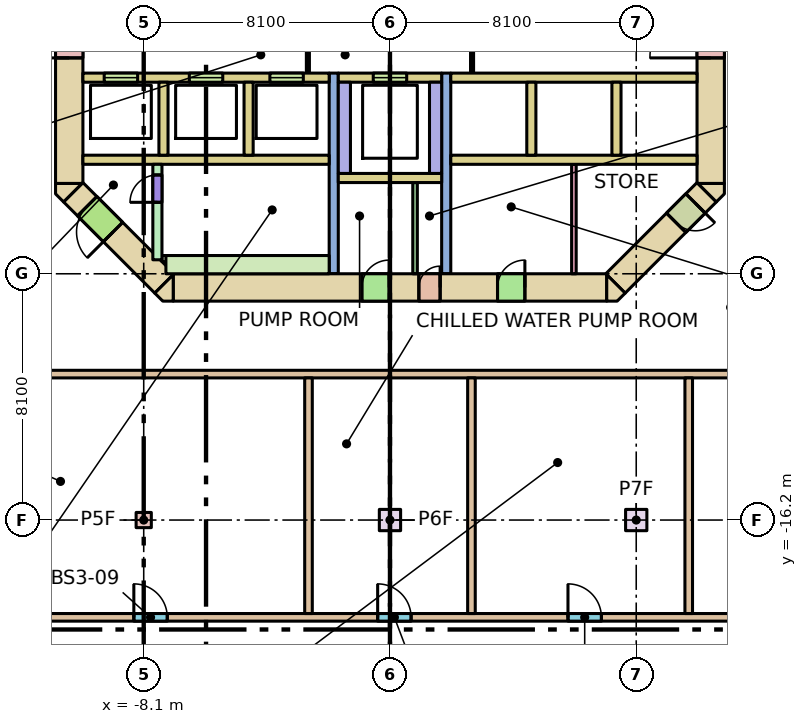
"""IFC4 building model, lengths in metres.
Left out: names, types, materials, properties, quantities, classifications, styles, units other than length and angle.
Written with IfcOpenShell. Run it as: python <this file> out.ifc"""

import sys

from ifc_helpers import new_model, si_unit, direction, frame, frame_2d, origin, origin_2d, place, context, subcontext, project, spatial, polyline, rectangle, outline, extrude, element, fill, save


model = new_model("IFC4")
c1 = context("Model", 3, precision=1e-05, world=origin(), true_north=direction((0.0, 1.0)))
c2 = subcontext(c1, "Body", "Model", "MODEL_VIEW")
j1 = project(units=[si_unit("LENGTHUNIT", "METRE"), si_unit("PLANEANGLEUNIT", "RADIAN")], contexts=[c1])
p1 = place(None, origin())
s1 = spatial("IfcSite", under=j1, at=p1, CompositionType="ELEMENT")
p2 = place(p1, origin())
s2 = spatial("IfcBuilding", under=s1, at=p2, CompositionType="ELEMENT")
p3 = place(p2, frame((0.0, 0.0, -10.8)))
s3 = spatial("IfcBuildingStorey", under=s2, at=p3, CompositionType="ELEMENT", Elevation=-10.8)
p4 = place(p3, frame((-8.1, -16.2, 0.0), z_axis=(0.0, 0.0, 1.0), x_axis=(1.0, 0.0, 0.0)))
e1 = element("IfcColumn", 1, at=p4, inside=s3, PredefinedType="COLUMN", context=c2, shape_type="SweptSolid", body=[
    extrude(rectangle(XDim=0.5, YDim=0.5, at=origin_2d()), origin(), (0.0, 0.0, 1.0), 3.6),
])
for number, where, z_axis, x_axis in (
    (2, (0.0, -16.2, 0.0), (0.0, 0.0, 1.0), (1.0, 0.0, 0.0)),
    (3, (8.1, -16.2, 0.0), (0.0, 0.0, 1.0), (1.0, 0.0, 0.0)),
):
    element("IfcColumn", number, at=place(p3, frame(where, z_axis=z_axis, x_axis=x_axis)), inside=s3, PredefinedType="COLUMN", context=c2, shape_type="SweptSolid", body=[
        extrude(rectangle(XDim=0.7, YDim=0.7, at=origin_2d()), origin(), (0.0, 0.0, 1.0), 3.6),
    ])
p5 = place(p3, frame((-7.13, -8.55, 0.0), z_axis=(0.0, 0.0, 1.0), x_axis=(1.0, 0.0, 0.0)))
e4 = element("IfcWall", 4, at=p5, inside=s3, PredefinedType="SHEAR", context=c2, shape_type="SweptSolid", body=[
    extrude(rectangle(XDim=14.26, YDim=0.9, at=frame_2d((7.13, 0.0))), origin(), (0.0, 0.0, 1.0), 3.28),
])
p6 = place(p5, frame((8.08, 0.0, 0.0)))
e5 = element("IfcOpeningElement", 5, at=p6, cuts=e4, PredefinedType="OPENING", context=c2, shape_type="SweptSolid", body=[
    extrude(rectangle(XDim=0.7, YDim=2.1, at=frame_2d((0.35, 1.05))), frame((0.0, 0.46, 0.0), z_axis=(0.0, -1.0, 0.0), x_axis=(1.0, 0.0, 0.0)), (0.0, 0.0, 1.0), 0.92),
])
p7 = place(p5, frame((6.205, 0.0, 0.0)))
e6 = element("IfcOpeningElement", 6, at=p7, cuts=e4, PredefinedType="OPENING", context=c2, shape_type="SweptSolid", body=[
    extrude(rectangle(XDim=0.9, YDim=2.1, at=frame_2d((0.45, 1.05))), frame((0.0, 0.46, 0.0), z_axis=(0.0, -1.0, 0.0), x_axis=(1.0, 0.0, 0.0)), (0.0, 0.0, 1.0), 0.92),
])
p8 = place(p5, frame((10.667, 0.0, 0.0)))
e7 = element("IfcOpeningElement", 7, at=p8, cuts=e4, PredefinedType="OPENING", context=c2, shape_type="SweptSolid", body=[
    extrude(rectangle(XDim=0.9, YDim=2.1, at=frame_2d((0.45, 1.05))), frame((0.0, 0.46, 0.0), z_axis=(0.0, -1.0, 0.0), x_axis=(1.0, 0.0, 0.0)), (0.0, 0.0, 1.0), 0.92),
])
p9 = place(p3, frame((-10.55, -5.13, 0.0), z_axis=(0.0, 0.0, 1.0), x_axis=(0.0, 1.0, 0.0)))
e8 = element("IfcWall", 8, at=p9, inside=s3, PredefinedType="SHEAR", context=c2, shape_type="SweptSolid", body=[
    extrude(rectangle(XDim=10.26, YDim=0.9, at=frame_2d((5.13, 0.0))), origin(), (0.0, 0.0, 1.0), 3.28),
])
p10 = place(p9, frame((4.13, 0.0, 0.0)))
e9 = element("IfcOpeningElement", 9, at=p10, cuts=e8, PredefinedType="OPENING", context=c2, shape_type="SweptSolid", body=[
    extrude(rectangle(XDim=2.0, YDim=2.1, at=frame_2d((1.0, 1.05))), frame((0.0, 0.46, 0.0), z_axis=(0.0, -1.0, 0.0), x_axis=(1.0, 0.0, 0.0)), (0.0, 0.0, 1.0), 0.92),
])
p11 = place(p3, frame((10.55, -5.13, 0.0), z_axis=(0.0, 0.0, 1.0), x_axis=(0.0, 1.0, 0.0)))
e10 = element("IfcWall", 10, at=p11, inside=s3, PredefinedType="SHEAR", context=c2, shape_type="SweptSolid", body=[
    extrude(rectangle(XDim=10.26, YDim=0.9, at=frame_2d((5.13, 0.0))), origin(), (0.0, 0.0, 1.0), 3.28),
])
p12 = place(p11, frame((4.13, 0.0, 0.0)))
e11 = element("IfcOpeningElement", 11, at=p12, cuts=e10, PredefinedType="OPENING", context=c2, shape_type="SweptSolid", body=[
    extrude(rectangle(XDim=2.0, YDim=2.1, at=frame_2d((1.0, 1.05))), frame((0.0, 0.46, 0.0), z_axis=(0.0, -1.0, 0.0), x_axis=(1.0, 0.0, 0.0)), (0.0, 0.0, 1.0), 0.92),
])
p13 = place(p3, frame((10.418, -5.418, 0.0), z_axis=(0.0, 0.0, 1.0), x_axis=(-0.707106781187, -0.707106781187, 0.0)))
e12 = element("IfcWall", 12, at=p13, inside=s3, PredefinedType="SHEAR", context=c2, shape_type="SweptSolid", body=[
    extrude(rectangle(XDim=4.243, YDim=0.9, at=frame_2d((2.121, 0.0))), origin(), (0.0, 0.0, 1.0), 3.28),
])
p14 = place(p13, frame((0.52, 0.0, 0.0)))
e13 = element("IfcOpeningElement", 13, at=p14, cuts=e12, PredefinedType="OPENING", context=c2, shape_type="SweptSolid", body=[
    extrude(rectangle(XDim=0.9, YDim=2.1, at=frame_2d((0.45, 1.05))), frame((0.0, 0.46, 0.0), z_axis=(0.0, -1.0, 0.0), x_axis=(1.0, 0.0, 0.0)), (0.0, 0.0, 1.0), 0.92),
])
p15 = place(p3, frame((-7.418, -8.418, 0.0), z_axis=(0.0, 0.0, 1.0), x_axis=(-0.707106781187, 0.707106781187, 0.0)))
e14 = element("IfcWall", 14, at=p15, inside=s3, PredefinedType="SHEAR", context=c2, shape_type="SweptSolid", body=[
    extrude(rectangle(XDim=4.243, YDim=0.9, at=frame_2d((2.121, 0.0))), origin(), (0.0, 0.0, 1.0), 3.28),
])
p16 = place(p15, frame((2.393, 0.0, 0.0)))
e15 = element("IfcOpeningElement", 15, at=p16, cuts=e14, PredefinedType="OPENING", context=c2, shape_type="SweptSolid", body=[
    extrude(rectangle(XDim=1.2, YDim=2.1, at=frame_2d((0.6, 1.05))), frame((0.0, 0.46, 0.0), z_axis=(0.0, -1.0, 0.0), x_axis=(1.0, 0.0, 0.0)), (0.0, 0.0, 1.0), 0.92),
])
p17 = place(p3, origin())
e16 = element("IfcWall", 16, at=p17, inside=s3, PredefinedType="SHEAR", context=c2, shape_type="SweptSolid", body=[
    extrude(outline(polyline([(-7.473, -9.0), (-7.736, -8.736), (-7.13, -8.13), (-7.13, -9.0), (-7.473, -9.0)])), origin(), (0.0, 0.0, 1.0), 3.28),
])
p18 = place(p3, origin())
e17 = element("IfcWall", 17, at=p18, inside=s3, PredefinedType="SHEAR", context=c2, shape_type="SweptSolid", body=[
    extrude(outline(polyline([(7.473, -9.0), (7.13, -9.0), (7.13, -8.13), (7.736, -8.736), (7.473, -9.0)])), origin(), (0.0, 0.0, 1.0), 3.28),
])
p19 = place(p3, origin())
e18 = element("IfcWall", 18, at=p19, inside=s3, PredefinedType="SHEAR", context=c2, shape_type="SweptSolid", body=[
    extrude(outline(polyline([(-11.0, -5.473), (-11.0, -5.13), (-10.13, -5.13), (-10.736, -5.736), (-11.0, -5.473)])), origin(), (0.0, 0.0, 1.0), 3.28),
])
p20 = place(p3, origin())
e19 = element("IfcWall", 19, at=p20, inside=s3, PredefinedType="SHEAR", context=c2, shape_type="SweptSolid", body=[
    extrude(outline(polyline([(11.0, -5.473), (10.736, -5.736), (10.13, -5.13), (11.0, -5.13), (11.0, -5.473)])), origin(), (0.0, 0.0, 1.0), 3.28),
])
for number, where, z_axis, x_axis in (
    (20, (-10.1, -4.35, 0.0), (0.0, 0.0, 1.0), (1.0, 0.0, 0.0)),
    (21, (2.0, -4.35, 0.0), (0.0, 0.0, 1.0), (1.0, 0.0, 0.0)),
):
    element("IfcWall", number, at=place(p3, frame(where, z_axis=z_axis, x_axis=x_axis)), inside=s3, PredefinedType="SOLIDWALL", context=c2, shape_type="SweptSolid", body=[
        extrude(rectangle(XDim=8.1, YDim=0.3, at=frame_2d((4.05, 0.0))), origin(), (0.0, 0.0, 1.0), 3.28),
    ])
p21 = place(p3, frame((-10.1, -1.65, 0.0), z_axis=(0.0, 0.0, 1.0), x_axis=(1.0, 0.0, 0.0)))
e22 = element("IfcWall", 22, at=p21, inside=s3, PredefinedType="SOLIDWALL", context=c2, shape_type="SweptSolid", body=[
    extrude(rectangle(XDim=8.1, YDim=0.3, at=frame_2d((4.05, 0.0))), origin(), (0.0, 0.0, 1.0), 3.28),
])
p22 = place(p21, frame((0.7, 0.0, 0.0)))
e23 = element("IfcOpeningElement", 23, at=p22, cuts=e22, PredefinedType="OPENING", context=c2, shape_type="SweptSolid", body=[
    extrude(rectangle(XDim=1.1, YDim=2.1, at=frame_2d((0.55, 1.05))), frame((0.0, 0.16, 0.0), z_axis=(0.0, -1.0, 0.0), x_axis=(1.0, 0.0, 0.0)), (0.0, 0.0, 1.0), 0.32),
])
p23 = place(p21, frame((3.5, 0.0, 0.0)))
e24 = element("IfcOpeningElement", 24, at=p23, cuts=e22, PredefinedType="OPENING", context=c2, shape_type="SweptSolid", body=[
    extrude(rectangle(XDim=1.1, YDim=2.1, at=frame_2d((0.55, 1.05))), frame((0.0, 0.16, 0.0), z_axis=(0.0, -1.0, 0.0), x_axis=(1.0, 0.0, 0.0)), (0.0, 0.0, 1.0), 0.32),
])
p24 = place(p21, frame((6.15, 0.0, 0.0)))
e25 = element("IfcOpeningElement", 25, at=p24, cuts=e22, PredefinedType="OPENING", context=c2, shape_type="SweptSolid", body=[
    extrude(rectangle(XDim=1.1, YDim=2.1, at=frame_2d((0.55, 1.05))), frame((0.0, 0.16, 0.0), z_axis=(0.0, -1.0, 0.0), x_axis=(1.0, 0.0, 0.0)), (0.0, 0.0, 1.0), 0.32),
])
p25 = place(p3, frame((2.0, -1.65, 0.0), z_axis=(0.0, 0.0, 1.0), x_axis=(1.0, 0.0, 0.0)))
e26 = element("IfcWall", 26, at=p25, inside=s3, PredefinedType="SOLIDWALL", context=c2, shape_type="SweptSolid", body=[
    extrude(rectangle(XDim=8.1, YDim=0.3, at=frame_2d((4.05, 0.0))), origin(), (0.0, 0.0, 1.0), 3.28),
])
for number, where, z_axis, x_axis in (
    (27, (-7.45, -4.2, 0.0), (0.0, 0.0, 1.0), (0.0, 1.0, 0.0)),
    (28, (-4.65, -4.2, 0.0), (0.0, 0.0, 1.0), (0.0, 1.0, 0.0)),
    (29, (4.65, -4.2, 0.0), (0.0, 0.0, 1.0), (0.0, 1.0, 0.0)),
    (30, (7.45, -4.2, 0.0), (0.0, 0.0, 1.0), (0.0, 1.0, 0.0)),
):
    element("IfcWall", number, at=place(p3, frame(where, z_axis=z_axis, x_axis=x_axis)), inside=s3, PredefinedType="SOLIDWALL", context=c2, shape_type="SweptSolid", body=[
        extrude(rectangle(XDim=2.4, YDim=0.3, at=frame_2d((1.2, 0.0))), origin(), (0.0, 0.0, 1.0), 3.28),
    ])
for number, where, z_axis, x_axis in (
    (31, (-1.85, -8.1, 0.0), (0.0, 0.0, 1.0), (0.0, 1.0, 0.0)),
    (32, (1.85, -8.1, 0.0), (0.0, 0.0, 1.0), (0.0, 1.0, 0.0)),
):
    element("IfcWall", number, at=place(p3, frame(where, z_axis=z_axis, x_axis=x_axis)), inside=s3, PredefinedType="SHEAR", context=c2, shape_type="SweptSolid", body=[
        extrude(rectangle(XDim=6.6, YDim=0.3, at=frame_2d((3.3, 0.0))), origin(), (0.0, 0.0, 1.0), 3.28),
    ])
p26 = place(p3, frame((-1.7, -1.65, 0.0), z_axis=(0.0, 0.0, 1.0), x_axis=(1.0, 0.0, 0.0)))
e33 = element("IfcWall", 33, at=p26, inside=s3, PredefinedType="SOLIDWALL", context=c2, shape_type="SweptSolid", body=[
    extrude(rectangle(XDim=3.4, YDim=0.3, at=frame_2d((1.7, 0.0))), origin(), (0.0, 0.0, 1.0), 3.28),
])
p27 = place(p26, frame((1.15, 0.0, 0.0)))
e34 = element("IfcOpeningElement", 34, at=p27, cuts=e33, PredefinedType="OPENING", context=c2, shape_type="SweptSolid", body=[
    extrude(rectangle(XDim=1.1, YDim=2.1, at=frame_2d((0.55, 1.05))), frame((0.0, 0.16, 0.0), z_axis=(0.0, -1.0, 0.0), x_axis=(1.0, 0.0, 0.0)), (0.0, 0.0, 1.0), 0.32),
])
for number, where, z_axis, x_axis in (
    (35, (-1.5, -4.8, 0.0), (0.0, 0.0, 1.0), (0.0, 1.0, 0.0)),
    (36, (1.5, -4.8, 0.0), (0.0, 0.0, 1.0), (0.0, 1.0, 0.0)),
):
    element("IfcWall", number, at=place(p3, frame(where, z_axis=z_axis, x_axis=x_axis)), inside=s3, PredefinedType="SOLIDWALL", context=c2, shape_type="SweptSolid", body=[
        extrude(rectangle(XDim=3.0, YDim=0.4, at=frame_2d((1.5, 0.0))), origin(), (0.0, 0.0, 1.0), 3.28),
    ])
p28 = place(p3, frame((-1.7, -4.95, 0.0), z_axis=(0.0, 0.0, 1.0), x_axis=(1.0, 0.0, 0.0)))
e37 = element("IfcWall", 37, at=p28, inside=s3, PredefinedType="SOLIDWALL", context=c2, shape_type="SweptSolid", body=[
    extrude(rectangle(XDim=3.4, YDim=0.3, at=frame_2d((1.7, 0.0))), origin(), (0.0, 0.0, 1.0), 3.28),
])
p29 = place(p3, frame((-7.65, -7.64, 0.0), z_axis=(0.0, 0.0, 1.0), x_axis=(0.0, 1.0, 0.0)))
e38 = element("IfcWall", 38, at=p29, inside=s3, PredefinedType="SHEAR", context=c2, shape_type="SweptSolid", body=[
    extrude(rectangle(XDim=3.14, YDim=0.3, at=frame_2d((1.57, 0.0))), origin(), (0.0, 0.0, 1.0), 3.28),
])
p30 = place(p29, frame((1.89, 0.0, 0.0)))
e39 = element("IfcOpeningElement", 39, at=p30, cuts=e38, PredefinedType="OPENING", context=c2, shape_type="SweptSolid", body=[
    extrude(rectangle(XDim=0.9, YDim=2.1, at=frame_2d((0.45, 1.05))), frame((0.0, 0.16, 0.0), z_axis=(0.0, -1.0, 0.0), x_axis=(1.0, 0.0, 0.0)), (0.0, 0.0, 1.0), 0.32),
])
p31 = place(p3, frame((-7.5, -7.6, 0.0), z_axis=(0.0, 0.0, 1.0), x_axis=(1.0, 0.0, 0.0)))
e40 = element("IfcWall", 40, at=p31, inside=s3, PredefinedType="SHEAR", context=c2, shape_type="SweptSolid", body=[
    extrude(rectangle(XDim=0.6, YDim=0.2, at=frame_2d((0.3, 0.0))), origin(), (0.0, 0.0, 1.0), 3.28),
])
p32 = place(p3, frame((-7.37, -7.8, 0.0), z_axis=(0.0, 0.0, 1.0), x_axis=(1.0, 0.0, 0.0)))
e41 = element("IfcWall", 41, at=p32, inside=s3, PredefinedType="SHEAR", context=c2, shape_type="SweptSolid", body=[
    extrude(rectangle(XDim=5.37, YDim=0.6, at=frame_2d((2.685, 0.0))), origin(), (0.0, 0.0, 1.0), 3.28),
])
p33 = place(p3, frame((-2.7, -1.5, 0.0), z_axis=(0.0, 0.0, 1.0), x_axis=(0.0, 1.0, 0.0)))
e42 = element("IfcWall", 42, at=p33, inside=s3, PredefinedType="PARTITIONING", context=c2, shape_type="SweptSolid", body=[
    extrude(rectangle(XDim=3.0, YDim=0.1, at=frame_2d((1.5, 0.0))), origin(), (0.0, 0.0, 1.0), 3.28),
])
p34 = place(p33, frame((0.9, 0.0, 0.0)))
e43 = element("IfcOpeningElement", 43, at=p34, cuts=e42, PredefinedType="OPENING", context=c2, shape_type="SweptSolid", body=[
    extrude(rectangle(XDim=1.2, YDim=2.1, at=frame_2d((0.6, 1.05))), frame((0.0, 0.06, 0.0), z_axis=(0.0, -1.0, 0.0), x_axis=(1.0, 0.0, 0.0)), (0.0, 0.0, 1.0), 0.12),
])
p35 = place(p3, frame((2.7, -1.5, 0.0), z_axis=(0.0, 0.0, 1.0), x_axis=(0.0, 1.0, 0.0)))
e44 = element("IfcWall", 44, at=p35, inside=s3, PredefinedType="PARTITIONING", context=c2, shape_type="SweptSolid", body=[
    extrude(rectangle(XDim=3.0, YDim=0.1, at=frame_2d((1.5, 0.0))), origin(), (0.0, 0.0, 1.0), 3.28),
])
p36 = place(p35, frame((0.9, 0.0, 0.0)))
e45 = element("IfcOpeningElement", 45, at=p36, cuts=e44, PredefinedType="OPENING", context=c2, shape_type="SweptSolid", body=[
    extrude(rectangle(XDim=1.2, YDim=2.1, at=frame_2d((0.6, 1.05))), frame((0.0, 0.06, 0.0), z_axis=(0.0, -1.0, 0.0), x_axis=(1.0, 0.0, 0.0)), (0.0, 0.0, 1.0), 0.12),
])
p37 = place(p3, frame((0.825, -8.1, 0.0), z_axis=(0.0, 0.0, 1.0), x_axis=(0.0, 1.0, 0.0)))
e46 = element("IfcWall", 46, at=p37, inside=s3, PredefinedType="PARTITIONING", context=c2, shape_type="SweptSolid", body=[
    extrude(rectangle(XDim=3.0, YDim=0.15, at=frame_2d((1.5, 0.0))), origin(), (0.0, 0.0, 1.0), 3.28),
])
p38 = place(p3, frame((6.05, -8.1, 0.0), z_axis=(0.0, 0.0, 1.0), x_axis=(0.0, 1.0, 0.0)))
e47 = element("IfcWall", 47, at=p38, inside=s3, PredefinedType="PARTITIONING", context=c2, shape_type="SweptSolid", body=[
    extrude(rectangle(XDim=3.6, YDim=0.15, at=frame_2d((1.8, 0.0))), origin(), (0.0, 0.0, 1.0), 3.28),
])
p39 = place(p3, frame((-17.778, -19.4, 0.0), z_axis=(0.0, 0.0, 1.0), x_axis=(1.0, 0.0, 0.0)))
e48 = element("IfcWall", 48, at=p39, inside=s3, PredefinedType="PARTITIONING", context=c2, shape_type="SweptSolid", body=[
    extrude(rectangle(XDim=35.557, YDim=0.25, at=frame_2d((17.778, 0.0))), origin(), (0.0, 0.0, 1.0), 3.28),
])
p40 = place(p39, frame((9.353, 0.0, 0.0)))
e49 = element("IfcOpeningElement", 49, at=p40, cuts=e48, PredefinedType="OPENING", context=c2, shape_type="SweptSolid", body=[
    extrude(rectangle(XDim=1.1, YDim=2.1, at=frame_2d((0.55, 1.05))), frame((0.0, 0.135, 0.0), z_axis=(0.0, -1.0, 0.0), x_axis=(1.0, 0.0, 0.0)), (0.0, 0.0, 1.0), 0.27),
])
p41 = place(p39, frame((17.373, 0.0, 0.0)))
e50 = element("IfcOpeningElement", 50, at=p41, cuts=e48, PredefinedType="OPENING", context=c2, shape_type="SweptSolid", body=[
    extrude(rectangle(XDim=1.1, YDim=2.1, at=frame_2d((0.55, 1.05))), frame((0.0, 0.135, 0.0), z_axis=(0.0, -1.0, 0.0), x_axis=(1.0, 0.0, 0.0)), (0.0, 0.0, 1.0), 0.27),
])
p42 = place(p39, frame((23.633, 0.0, 0.0)))
e51 = element("IfcOpeningElement", 51, at=p42, cuts=e48, PredefinedType="OPENING", context=c2, shape_type="SweptSolid", body=[
    extrude(rectangle(XDim=1.1, YDim=2.1, at=frame_2d((0.55, 1.05))), frame((0.0, 0.135, 0.0), z_axis=(0.0, -1.0, 0.0), x_axis=(1.0, 0.0, 0.0)), (0.0, 0.0, 1.0), 0.27),
])
p43 = place(p39, frame((31.08, 0.0, 0.0)))
e52 = element("IfcOpeningElement", 52, at=p43, cuts=e48, PredefinedType="OPENING", context=c2, shape_type="SweptSolid", body=[
    extrude(rectangle(XDim=1.1, YDim=2.1, at=frame_2d((0.55, 1.05))), frame((0.0, 0.135, 0.0), z_axis=(0.0, -1.0, 0.0), x_axis=(1.0, 0.0, 0.0)), (0.0, 0.0, 1.0), 0.27),
])
p44 = place(p3, frame((-13.275, -11.4, 0.0), z_axis=(0.0, 0.0, 1.0), x_axis=(1.0, 0.0, 0.0)))
e53 = element("IfcWall", 53, at=p44, inside=s3, PredefinedType="PARTITIONING", context=c2, shape_type="SweptSolid", body=[
    extrude(rectangle(XDim=34.55, YDim=0.25, at=frame_2d((17.275, 0.0))), origin(), (0.0, 0.0, 1.0), 3.28),
])
for number, where, z_axis, x_axis in (
    (54, (-2.68, -19.275, 0.0), (0.0, 0.0, 1.0), (0.0, 1.0, 0.0)),
    (55, (2.68, -19.275, 0.0), (0.0, 0.0, 1.0), (0.0, 1.0, 0.0)),
    (56, (9.827, -19.275, 0.0), (0.0, 0.0, 1.0), (0.0, 1.0, 0.0)),
):
    element("IfcWall", number, at=place(p3, frame(where, z_axis=z_axis, x_axis=x_axis)), inside=s3, PredefinedType="PARTITIONING", context=c2, shape_type="SweptSolid", body=[
        extrude(rectangle(XDim=7.75, YDim=0.25, at=frame_2d((3.875, 0.0))), origin(), (0.0, 0.0, 1.0), 3.28),
    ])
p45 = place(p22, origin())
e57 = element("IfcDoor", 57, at=p45, inside=s3, OperationType="DOUBLE_DOOR_SLIDING", PredefinedType="DOOR", context=c2, shape_type="SweptSolid", body=[
    extrude(rectangle(XDim=1.1, YDim=2.1, at=frame_2d((0.55, 1.05))), frame((0.0, 0.025, 0.0), z_axis=(0.0, -1.0, 0.0), x_axis=(1.0, 0.0, 0.0)), (0.0, 0.0, 1.0), 0.05),
])
fill(e23, e57)
p46 = place(p23, origin())
e58 = element("IfcDoor", 58, at=p46, inside=s3, OperationType="DOUBLE_DOOR_SLIDING", PredefinedType="DOOR", context=c2, shape_type="SweptSolid", body=[
    extrude(rectangle(XDim=1.1, YDim=2.1, at=frame_2d((0.55, 1.05))), frame((0.0, 0.025, 0.0), z_axis=(0.0, -1.0, 0.0), x_axis=(1.0, 0.0, 0.0)), (0.0, 0.0, 1.0), 0.05),
])
fill(e24, e58)
p47 = place(p24, origin())
e59 = element("IfcDoor", 59, at=p47, inside=s3, OperationType="DOUBLE_DOOR_SLIDING", PredefinedType="DOOR", context=c2, shape_type="SweptSolid", body=[
    extrude(rectangle(XDim=1.1, YDim=2.1, at=frame_2d((0.55, 1.05))), frame((0.0, 0.025, 0.0), z_axis=(0.0, -1.0, 0.0), x_axis=(1.0, 0.0, 0.0)), (0.0, 0.0, 1.0), 0.05),
])
fill(e25, e59)
p48 = place(p27, origin())
e60 = element("IfcDoor", 60, at=p48, inside=s3, OperationType="DOUBLE_DOOR_SLIDING", PredefinedType="DOOR", context=c2, shape_type="SweptSolid", body=[
    extrude(rectangle(XDim=1.1, YDim=2.1, at=frame_2d((0.55, 1.05))), frame((0.0, 0.025, 0.0), z_axis=(0.0, -1.0, 0.0), x_axis=(1.0, 0.0, 0.0)), (0.0, 0.0, 1.0), 0.05),
])
fill(e34, e60)
p49 = place(p30, origin())
e61 = element("IfcDoor", 61, at=p49, inside=s3, OperationType="SINGLE_SWING_LEFT", PredefinedType="DOOR", context=c2, shape_type="SweptSolid", body=[
    extrude(rectangle(XDim=0.9, YDim=2.1, at=frame_2d((0.45, 1.05))), frame((0.0, 0.025, 0.0), z_axis=(0.0, -1.0, 0.0), x_axis=(1.0, 0.0, 0.0)), (0.0, 0.0, 1.0), 0.05),
])
fill(e39, e61)
p50 = place(p16, origin())
e62 = element("IfcDoor", 62, at=p50, inside=s3, OperationType="SINGLE_SWING_LEFT", PredefinedType="DOOR", context=c2, shape_type="SweptSolid", body=[
    extrude(rectangle(XDim=1.2, YDim=2.1, at=frame_2d((0.6, 1.05))), frame((0.0, 0.025, 0.0), z_axis=(0.0, -1.0, 0.0), x_axis=(1.0, 0.0, 0.0)), (0.0, 0.0, 1.0), 0.05),
])
fill(e15, e62)
p51 = place(p10, origin())
e63 = element("IfcDoor", 63, at=p51, inside=s3, OperationType="DOUBLE_DOOR_SINGLE_SWING", PredefinedType="DOOR", context=c2, shape_type="SweptSolid", body=[
    extrude(rectangle(XDim=2.0, YDim=2.1, at=frame_2d((1.0, 1.05))), frame((0.0, 0.025, 0.0), z_axis=(0.0, -1.0, 0.0), x_axis=(1.0, 0.0, 0.0)), (0.0, 0.0, 1.0), 0.05),
])
fill(e9, e63)
p52 = place(p12, origin())
e64 = element("IfcDoor", 64, at=p52, inside=s3, OperationType="DOUBLE_DOOR_SINGLE_SWING", PredefinedType="DOOR", context=c2, shape_type="SweptSolid", body=[
    extrude(rectangle(XDim=2.0, YDim=2.1, at=frame_2d((1.0, 1.05))), frame((0.0, 0.025, 0.0), z_axis=(0.0, -1.0, 0.0), x_axis=(1.0, 0.0, 0.0)), (0.0, 0.0, 1.0), 0.05),
])
fill(e11, e64)
p53 = place(p6, origin())
e65 = element("IfcDoor", 65, at=p53, inside=s3, OperationType="SINGLE_SWING_RIGHT", PredefinedType="DOOR", context=c2, shape_type="SweptSolid", body=[
    extrude(rectangle(XDim=0.7, YDim=2.1, at=frame_2d((0.35, 1.05))), frame((0.0, 0.025, 0.0), z_axis=(0.0, -1.0, 0.0), x_axis=(1.0, 0.0, 0.0)), (0.0, 0.0, 1.0), 0.05),
])
fill(e5, e65)
p54 = place(p7, origin())
e66 = element("IfcDoor", 66, at=p54, inside=s3, OperationType="SINGLE_SWING_RIGHT", PredefinedType="DOOR", context=c2, shape_type="SweptSolid", body=[
    extrude(rectangle(XDim=0.9, YDim=2.1, at=frame_2d((0.45, 1.05))), frame((0.0, 0.025, 0.0), z_axis=(0.0, -1.0, 0.0), x_axis=(1.0, 0.0, 0.0)), (0.0, 0.0, 1.0), 0.05),
])
fill(e6, e66)
p55 = place(p8, origin())
e67 = element("IfcDoor", 67, at=p55, inside=s3, OperationType="SINGLE_SWING_RIGHT", PredefinedType="DOOR", context=c2, shape_type="SweptSolid", body=[
    extrude(rectangle(XDim=0.9, YDim=2.1, at=frame_2d((0.45, 1.05))), frame((0.0, 0.025, 0.0), z_axis=(0.0, -1.0, 0.0), x_axis=(1.0, 0.0, 0.0)), (0.0, 0.0, 1.0), 0.05),
])
fill(e7, e67)
p56 = place(p14, origin())
e68 = element("IfcDoor", 68, at=p56, inside=s3, OperationType="SINGLE_SWING_LEFT", PredefinedType="DOOR", context=c2, shape_type="SweptSolid", body=[
    extrude(rectangle(XDim=0.9, YDim=2.1, at=frame_2d((0.45, 1.05))), frame((0.0, 0.025, 0.0), z_axis=(0.0, -1.0, 0.0), x_axis=(1.0, 0.0, 0.0)), (0.0, 0.0, 1.0), 0.05),
])
fill(e13, e68)
p57 = place(p40, origin())
e69 = element("IfcDoor", 69, at=p57, inside=s3, OperationType="SINGLE_SWING_LEFT", PredefinedType="DOOR", context=c2, shape_type="SweptSolid", body=[
    extrude(rectangle(XDim=1.1, YDim=2.1, at=frame_2d((0.55, 1.05))), frame((0.0, 0.025, 0.0), z_axis=(0.0, -1.0, 0.0), x_axis=(1.0, 0.0, 0.0)), (0.0, 0.0, 1.0), 0.05),
])
fill(e49, e69)
p58 = place(p41, origin())
e70 = element("IfcDoor", 70, at=p58, inside=s3, OperationType="SINGLE_SWING_LEFT", PredefinedType="DOOR", context=c2, shape_type="SweptSolid", body=[
    extrude(rectangle(XDim=1.1, YDim=2.1, at=frame_2d((0.55, 1.05))), frame((0.0, 0.025, 0.0), z_axis=(0.0, -1.0, 0.0), x_axis=(1.0, 0.0, 0.0)), (0.0, 0.0, 1.0), 0.05),
])
fill(e50, e70)
p59 = place(p42, origin())
e71 = element("IfcDoor", 71, at=p59, inside=s3, OperationType="SINGLE_SWING_LEFT", PredefinedType="DOOR", context=c2, shape_type="SweptSolid", body=[
    extrude(rectangle(XDim=1.1, YDim=2.1, at=frame_2d((0.55, 1.05))), frame((0.0, 0.025, 0.0), z_axis=(0.0, -1.0, 0.0), x_axis=(1.0, 0.0, 0.0)), (0.0, 0.0, 1.0), 0.05),
])
fill(e51, e71)
save(model, sys.argv[1])
